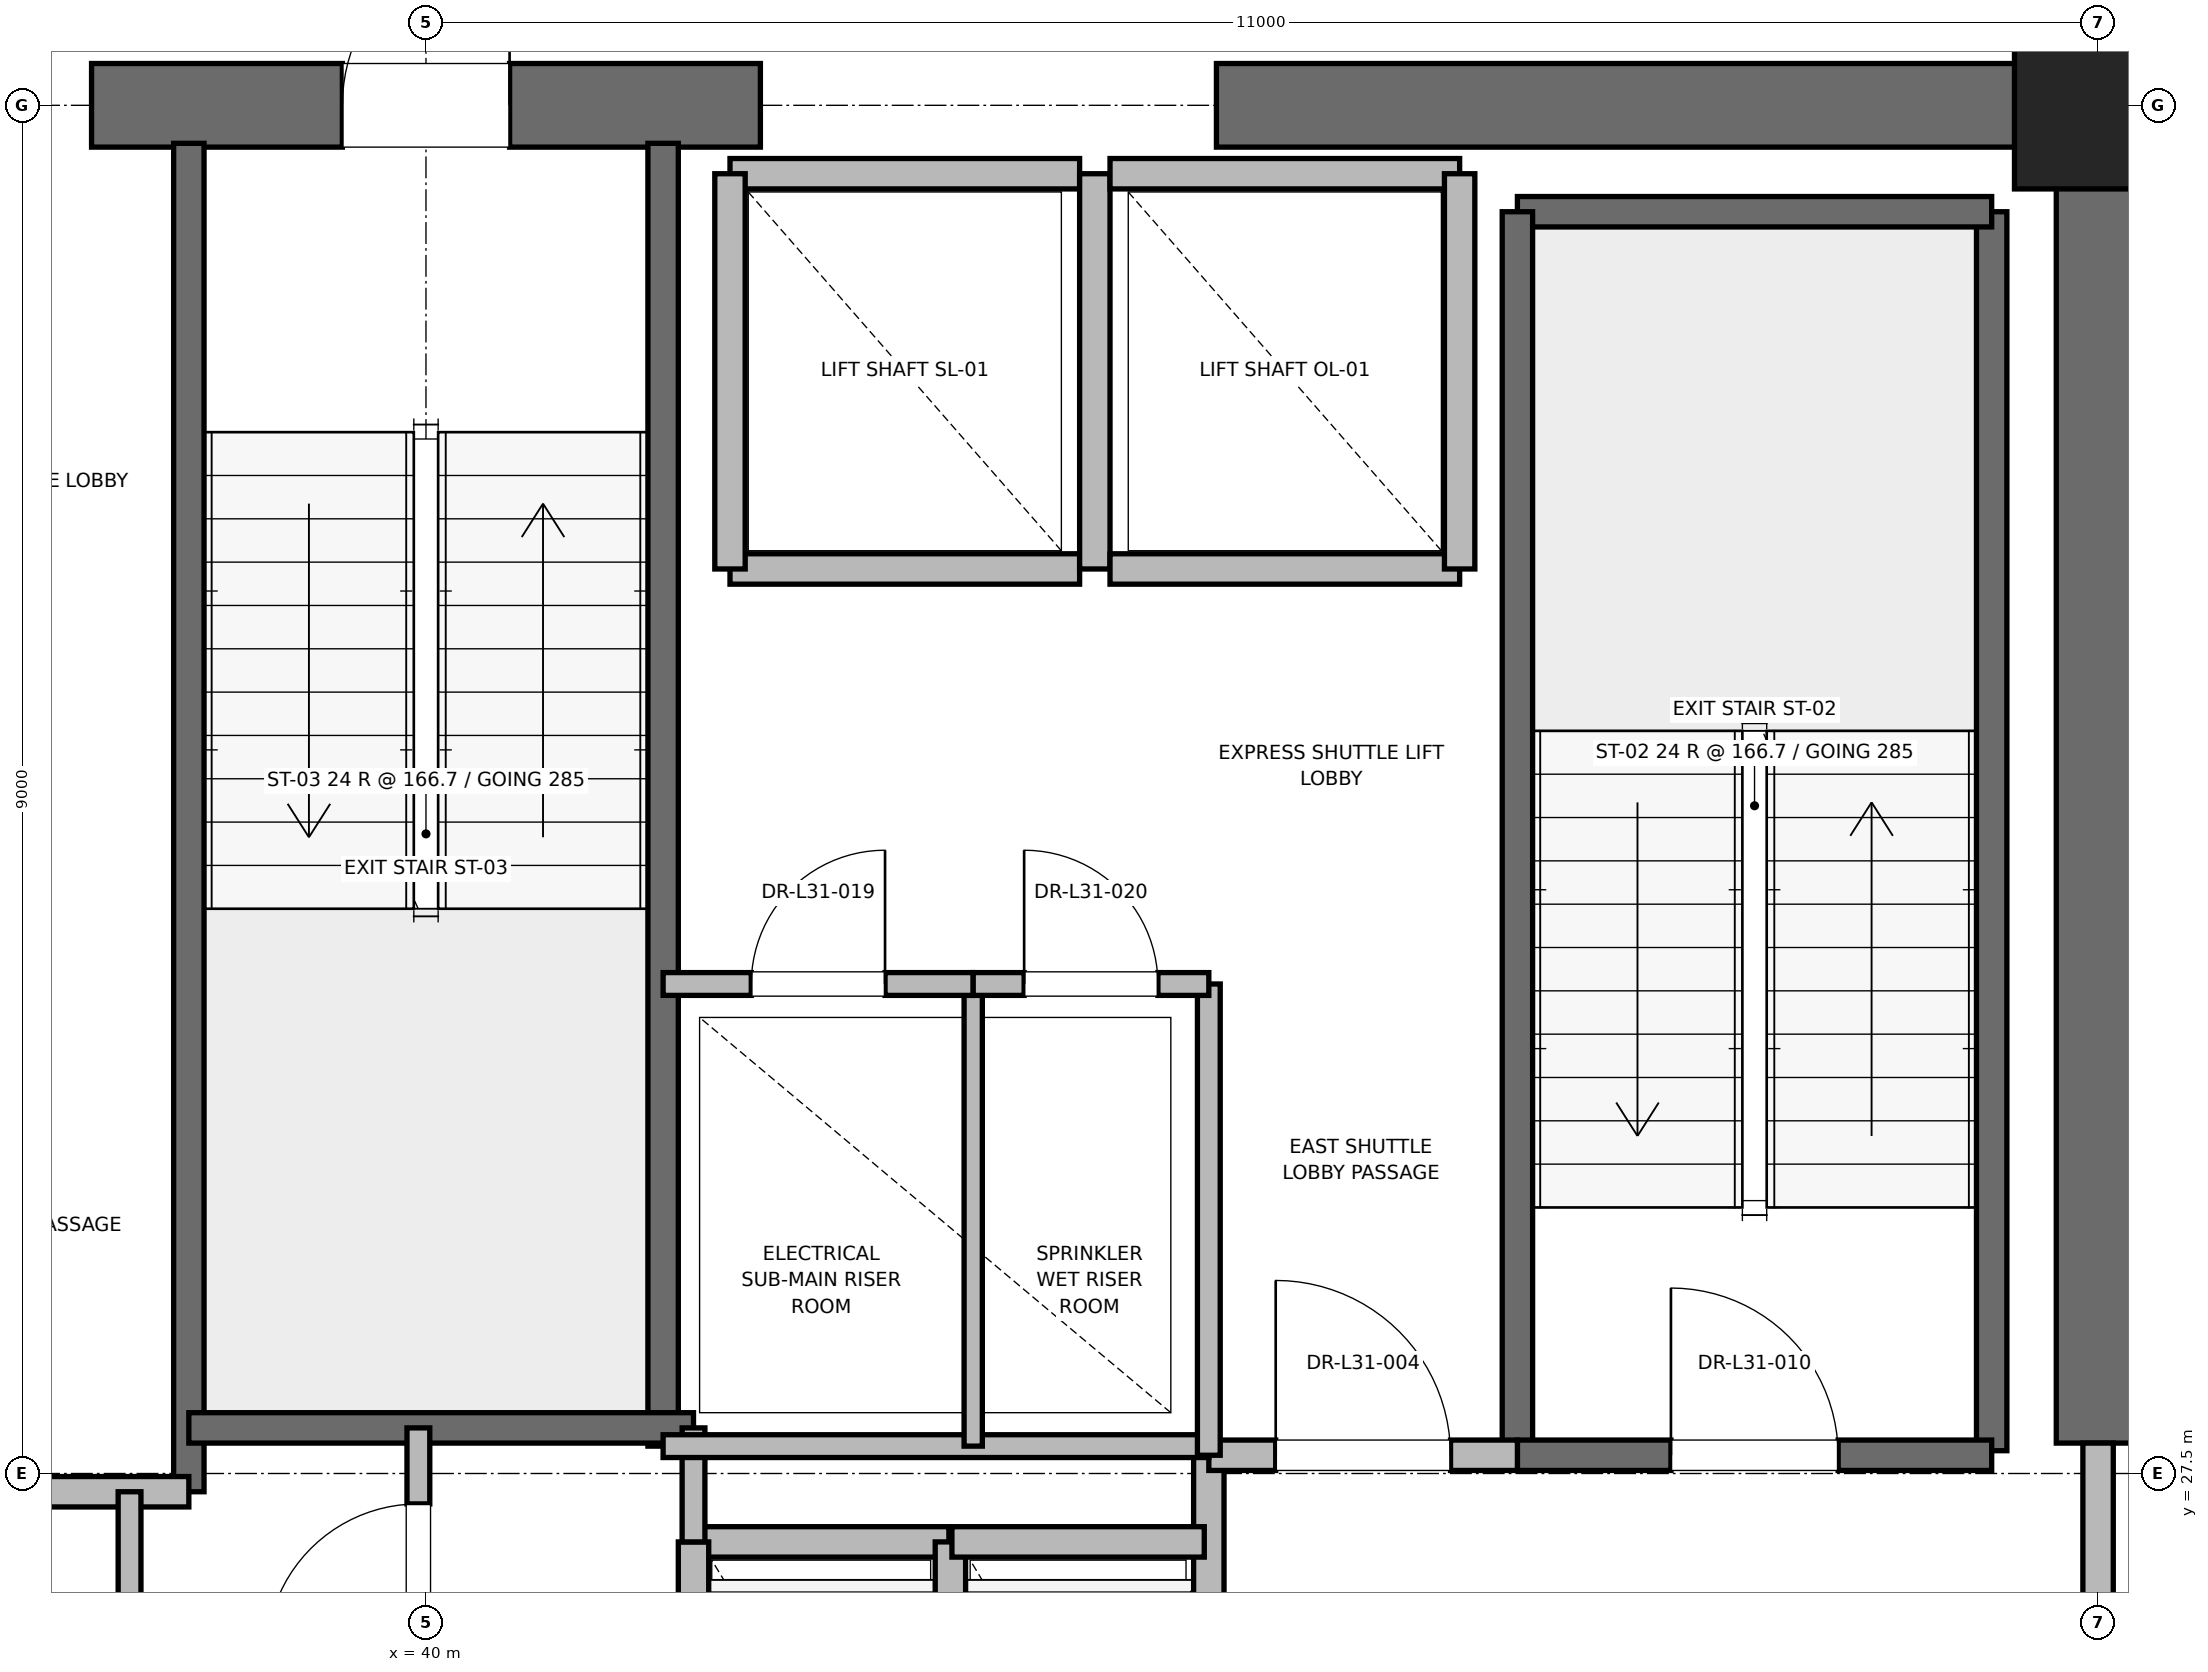
"""IFC4 building model, lengths in metres.
Left out: names, types, materials, properties, quantities, classifications, styles, units other than length and angle.
Written with IfcOpenShell. Run it as: python <this file> out.ifc"""

import sys

from ifc_helpers import new_model, si_unit, direction, frame, frame_2d, origin, origin_2d, place, context, subcontext, project, spatial, rectangle, extrude, element, fill, save


model = new_model("IFC4")
c1 = context("Model", 3, precision=1e-05, world=origin(), true_north=direction((0.0, 1.0)))
c2 = subcontext(c1, "Body", "Model", "MODEL_VIEW")
j1 = project(units=[si_unit("LENGTHUNIT", "METRE"), si_unit("PLANEANGLEUNIT", "RADIAN")], contexts=[c1])
p1 = place(None, origin())
s1 = spatial("IfcSite", under=j1, at=p1, CompositionType="ELEMENT")
p2 = place(p1, origin())
s2 = spatial("IfcBuilding", under=s1, at=p2, CompositionType="ELEMENT")
p3 = place(p2, frame((0.0, 0.0, 136.4)))
s3 = spatial("IfcBuildingStorey", under=s2, at=p3, CompositionType="ELEMENT", Elevation=136.4)
p4 = place(p3, frame((51.0, 36.5, 0.0), z_axis=(0.0, 0.0, 1.0), x_axis=(1.0, 0.0, 0.0)))
e1 = element("IfcColumn", 1, at=p4, inside=s3, PredefinedType="PILASTER", context=c2, shape_type="SweptSolid", body=[
    extrude(rectangle(XDim=1.1, YDim=1.1, at=origin_2d()), origin(), (0.0, 0.0, 1.0), 4.0),
])
p5 = place(p3, frame((37.8, 36.5, 0.0), z_axis=(0.0, 0.0, 1.0), x_axis=(1.0, 0.0, 0.0)))
e2 = element("IfcWall", 2, at=p5, inside=s3, PredefinedType="SHEAR", context=c2, shape_type="SweptSolid", body=[
    extrude(rectangle(XDim=4.4, YDim=0.55, at=frame_2d((2.2, 0.0))), origin(), (0.0, 0.0, 1.0), 3.775),
])
p6 = place(p5, frame((1.65, 0.0, 0.0)))
e3 = element("IfcOpeningElement", 3, at=p6, cuts=e2, PredefinedType="OPENING", context=c2, shape_type="SweptSolid", body=[
    extrude(rectangle(XDim=1.1, YDim=2.15, at=frame_2d((0.55, 1.075))), frame((0.0, 0.275, 0.0), z_axis=(0.0, -1.0, 0.0), x_axis=(1.0, 0.0, 0.0)), (0.0, 0.0, 1.0), 0.55),
])
p7 = place(p3, frame((45.2, 36.5, 0.0), z_axis=(0.0, 0.0, 1.0), x_axis=(1.0, 0.0, 0.0)))
e4 = element("IfcWall", 4, at=p7, inside=s3, PredefinedType="SHEAR", context=c2, shape_type="SweptSolid", body=[
    extrude(rectangle(XDim=5.8, YDim=0.55, at=frame_2d((2.9, 0.0))), origin(), (0.0, 0.0, 1.0), 3.775),
])
p8 = place(p3, frame((51.0, 27.7, 0.0), z_axis=(0.0, 0.0, 1.0), x_axis=(0.0, 1.0, 0.0)))
e5 = element("IfcWall", 5, at=p8, inside=s3, PredefinedType="SHEAR", context=c2, shape_type="SweptSolid", body=[
    extrude(rectangle(XDim=8.8, YDim=0.55, at=frame_2d((4.4, 0.0))), origin(), (0.0, 0.0, 1.0), 3.775),
])
p9 = place(p3, frame((50.3, 27.65, 0.0), z_axis=(0.0, 0.0, 1.0), x_axis=(0.0, 1.0, 0.0)))
e6 = element("IfcWall", 6, at=p9, inside=s3, PredefinedType="SOLIDWALL", context=c2, shape_type="SweptSolid", body=[
    extrude(rectangle(XDim=8.15, YDim=0.2, at=frame_2d((4.075, 0.0))), origin(), (0.0, 0.0, 1.0), 3.775),
])
p10 = place(p3, frame((47.18, 35.8, 0.0), z_axis=(0.0, 0.0, 1.0), x_axis=(1.0, 0.0, 0.0)))
e7 = element("IfcWall", 7, at=p10, inside=s3, PredefinedType="SOLIDWALL", context=c2, shape_type="SweptSolid", body=[
    extrude(rectangle(XDim=3.12, YDim=0.2, at=frame_2d((1.56, 0.0))), origin(), (0.0, 0.0, 1.0), 3.775),
])
p11 = place(p3, frame((47.18, 27.62, 0.0), z_axis=(0.0, 0.0, 1.0), x_axis=(0.0, 1.0, 0.0)))
e8 = element("IfcWall", 8, at=p11, inside=s3, PredefinedType="SOLIDWALL", context=c2, shape_type="SweptSolid", body=[
    extrude(rectangle(XDim=8.18, YDim=0.2, at=frame_2d((4.09, 0.0))), origin(), (0.0, 0.0, 1.0), 3.775),
])
p12 = place(p3, frame((47.18, 27.62, 0.0), z_axis=(0.0, 0.0, 1.0), x_axis=(1.0, 0.0, 0.0)))
e9 = element("IfcWall", 9, at=p12, inside=s3, PredefinedType="SOLIDWALL", context=c2, shape_type="SweptSolid", body=[
    extrude(rectangle(XDim=3.12, YDim=0.2, at=frame_2d((1.56, 0.0))), origin(), (0.0, 0.0, 1.0), 3.775),
])
p13 = place(p12, frame((1.01, 0.0, 0.0)))
e10 = element("IfcOpeningElement", 10, at=p13, cuts=e9, PredefinedType="OPENING", context=c2, shape_type="SweptSolid", body=[
    extrude(rectangle(XDim=1.1, YDim=2.15, at=frame_2d((0.55, 1.075))), frame((0.0, 0.1, 0.0), z_axis=(0.0, -1.0, 0.0), x_axis=(1.0, 0.0, 0.0)), (0.0, 0.0, 1.0), 0.2),
])
p14 = place(p3, frame((38.44, 27.38, 0.0), z_axis=(0.0, 0.0, 1.0), x_axis=(0.0, 1.0, 0.0)))
e11 = element("IfcWall", 11, at=p14, inside=s3, PredefinedType="SOLIDWALL", context=c2, shape_type="SweptSolid", body=[
    extrude(rectangle(XDim=8.87, YDim=0.2, at=frame_2d((4.435, 0.0))), origin(), (0.0, 0.0, 1.0), 3.775),
])
p15 = place(p3, frame((41.56, 27.68, 0.0), z_axis=(0.0, 0.0, 1.0), x_axis=(0.0, 1.0, 0.0)))
e12 = element("IfcWall", 12, at=p15, inside=s3, PredefinedType="SOLIDWALL", context=c2, shape_type="SweptSolid", body=[
    extrude(rectangle(XDim=8.57, YDim=0.2, at=frame_2d((4.285, 0.0))), origin(), (0.0, 0.0, 1.0), 3.775),
])
p16 = place(p3, frame((38.44, 27.8, 0.0), z_axis=(0.0, 0.0, 1.0), x_axis=(1.0, 0.0, 0.0)))
e13 = element("IfcWall", 13, at=p16, inside=s3, PredefinedType="SOLIDWALL", context=c2, shape_type="SweptSolid", body=[
    extrude(rectangle(XDim=3.32, YDim=0.2, at=frame_2d((1.66, 0.0))), origin(), (0.0, 0.0, 1.0), 3.775),
])
p17 = place(p3, frame((32.82, 27.38, 0.0), z_axis=(0.0, 0.0, 1.0), x_axis=(1.0, 0.0, 0.0)))
e14 = element("IfcWall", 14, at=p17, inside=s3, PredefinedType="PARTITIONING", context=c2, shape_type="SweptSolid", body=[
    extrude(rectangle(XDim=5.62, YDim=0.2, at=frame_2d((2.81, 0.0))), origin(), (0.0, 0.0, 1.0), 3.775),
])
p18 = place(p3, frame((45.15, 24.25, 0.0), z_axis=(0.0, 0.0, 1.0), x_axis=(0.0, 1.0, 0.0)))
e15 = element("IfcWall", 15, at=p18, inside=s3, PredefinedType="PARTITIONING", context=c2, shape_type="SweptSolid", body=[
    extrude(rectangle(XDim=3.37, YDim=0.2, at=frame_2d((1.685, 0.0))), origin(), (0.0, 0.0, 1.0), 3.775),
])
p19 = place(p3, frame((45.15, 27.62, 0.0), z_axis=(0.0, 0.0, 1.0), x_axis=(1.0, 0.0, 0.0)))
e16 = element("IfcWall", 16, at=p19, inside=s3, PredefinedType="PARTITIONING", context=c2, shape_type="SweptSolid", body=[
    extrude(rectangle(XDim=2.03, YDim=0.2, at=frame_2d((1.015, 0.0))), origin(), (0.0, 0.0, 1.0), 3.775),
])
p20 = place(p19, frame((0.44, 0.0, 0.0)))
e17 = element("IfcOpeningElement", 17, at=p20, cuts=e16, PredefinedType="OPENING", context=c2, shape_type="SweptSolid", body=[
    extrude(rectangle(XDim=1.15, YDim=2.2, at=frame_2d((0.575, 1.1))), frame((0.0, 0.1, 0.0), z_axis=(0.0, -1.0, 0.0), x_axis=(1.0, 0.0, 0.0)), (0.0, 0.0, 1.0), 0.2),
])
p21 = place(p3, frame((51.0, 24.3, 0.0), z_axis=(0.0, 0.0, 1.0), x_axis=(0.0, 1.0, 0.0)))
e18 = element("IfcWall", 18, at=p21, inside=s3, PredefinedType="PARTITIONING", context=c2, shape_type="SweptSolid", body=[
    extrude(rectangle(XDim=3.4, YDim=0.2, at=frame_2d((1.7, 0.0))), origin(), (0.0, 0.0, 1.0), 2.755),
])
p22 = place(p21, frame((1.125, 0.0, 0.0)))
e19 = element("IfcOpeningElement", 19, at=p22, cuts=e18, PredefinedType="OPENING", context=c2, shape_type="SweptSolid", body=[
    extrude(rectangle(XDim=1.15, YDim=2.2, at=frame_2d((0.575, 1.1))), frame((0.0, 0.1, 0.0), z_axis=(0.0, -1.0, 0.0), x_axis=(1.0, 0.0, 0.0)), (0.0, 0.0, 1.0), 0.2),
])
p23 = place(p3, frame((43.44, 27.05, 0.0), z_axis=(0.0, 0.0, 1.0), x_axis=(-1.0, 0.0, 0.0)))
e20 = element("IfcWall", 20, at=p23, inside=s3, PredefinedType="SOLIDWALL", context=c2, shape_type="SweptSolid", body=[
    extrude(rectangle(XDim=1.68, YDim=0.2, at=frame_2d((0.84, 0.0))), origin(), (0.0, 0.0, 1.0), 3.775),
])
for number, where, z_axis, x_axis in (
    (21, (41.76, 27.05, 0.0), (0.0, 0.0, 1.0), (0.0, -1.0, 0.0)),
    (22, (43.45, 24.45, 0.0), (0.0, 0.0, 1.0), (0.0, 1.0, 0.0)),
):
    element("IfcWall", number, at=place(p3, frame(where, z_axis=z_axis, x_axis=x_axis)), inside=s3, PredefinedType="SOLIDWALL", context=c2, shape_type="SweptSolid", body=[
        extrude(rectangle(XDim=2.6, YDim=0.2, at=frame_2d((1.3, 0.0))), origin(), (0.0, 0.0, 1.0), 3.775),
    ])
p24 = place(p3, frame((45.12, 27.05, 0.0), z_axis=(0.0, 0.0, 1.0), x_axis=(-1.0, 0.0, 0.0)))
e23 = element("IfcWall", 23, at=p24, inside=s3, PredefinedType="SOLIDWALL", context=c2, shape_type="SweptSolid", body=[
    extrude(rectangle(XDim=1.66, YDim=0.2, at=frame_2d((0.83, 0.0))), origin(), (0.0, 0.0, 1.0), 3.775),
])
p25 = place(p3, frame((42.0, 33.45, 0.0), z_axis=(0.0, 0.0, 1.0), x_axis=(1.0, 0.0, 0.0)))
e24 = element("IfcWall", 24, at=p25, inside=s3, PredefinedType="SOLIDWALL", context=c2, shape_type="SweptSolid", body=[
    extrude(rectangle(XDim=2.3, YDim=0.2, at=frame_2d((1.15, 0.0))), origin(), (0.0, 0.0, 1.0), 3.775),
])
p26 = place(p3, frame((44.3, 36.05, 0.0), z_axis=(0.0, 0.0, 1.0), x_axis=(-1.0, 0.0, 0.0)))
e25 = element("IfcWall", 25, at=p26, inside=s3, PredefinedType="SOLIDWALL", context=c2, shape_type="SweptSolid", body=[
    extrude(rectangle(XDim=2.3, YDim=0.2, at=frame_2d((1.15, 0.0))), origin(), (0.0, 0.0, 1.0), 2.755),
])
for number, where, z_axis, x_axis in (
    (26, (42.0, 36.05, 0.0), (0.0, 0.0, 1.0), (0.0, -1.0, 0.0)),
    (27, (44.4, 33.45, 0.0), (0.0, 0.0, 1.0), (0.0, 1.0, 0.0)),
):
    element("IfcWall", number, at=place(p3, frame(where, z_axis=z_axis, x_axis=x_axis)), inside=s3, PredefinedType="SOLIDWALL", context=c2, shape_type="SweptSolid", body=[
        extrude(rectangle(XDim=2.6, YDim=0.2, at=frame_2d((1.3, 0.0))), origin(), (0.0, 0.0, 1.0), 2.755),
    ])
p27 = place(p3, frame((44.5, 33.45, 0.0), z_axis=(0.0, 0.0, 1.0), x_axis=(1.0, 0.0, 0.0)))
e28 = element("IfcWall", 28, at=p27, inside=s3, PredefinedType="SOLIDWALL", context=c2, shape_type="SweptSolid", body=[
    extrude(rectangle(XDim=2.3, YDim=0.2, at=frame_2d((1.15, 0.0))), origin(), (0.0, 0.0, 1.0), 3.775),
])
p28 = place(p3, frame((46.8, 36.05, 0.0), z_axis=(0.0, 0.0, 1.0), x_axis=(-1.0, 0.0, 0.0)))
e29 = element("IfcWall", 29, at=p28, inside=s3, PredefinedType="SOLIDWALL", context=c2, shape_type="SweptSolid", body=[
    extrude(rectangle(XDim=2.3, YDim=0.2, at=frame_2d((1.15, 0.0))), origin(), (0.0, 0.0, 1.0), 2.755),
])
p29 = place(p3, frame((46.8, 33.45, 0.0), z_axis=(0.0, 0.0, 1.0), x_axis=(0.0, 1.0, 0.0)))
e30 = element("IfcWall", 30, at=p29, inside=s3, PredefinedType="SOLIDWALL", context=c2, shape_type="SweptSolid", body=[
    extrude(rectangle(XDim=2.6, YDim=0.2, at=frame_2d((1.3, 0.0))), origin(), (0.0, 0.0, 1.0), 3.775),
])
p30 = place(p3, frame((41.76, 27.05, 0.0), z_axis=(0.0, 0.0, 1.0), x_axis=(0.0, 1.0, 0.0)))
e31 = element("IfcWall", 31, at=p30, inside=s3, PredefinedType="PARTITIONING", context=c2, shape_type="SweptSolid", body=[
    extrude(rectangle(XDim=0.75, YDim=0.15, at=frame_2d((0.375, 0.0))), origin(), (0.0, 0.0, 1.0), 2.85),
])
p31 = place(p3, frame((39.95, 25.8, 0.0), z_axis=(0.0, 0.0, 1.0), x_axis=(0.0, 1.0, 0.0)))
e32 = element("IfcWall", 32, at=p31, inside=s3, PredefinedType="PARTITIONING", context=c2, shape_type="SweptSolid", body=[
    extrude(rectangle(XDim=2.0, YDim=0.15, at=frame_2d((1.0, 0.0))), origin(), (0.0, 0.0, 1.0), 2.85),
])
p32 = place(p31, frame((0.5, 0.0, 0.0)))
e33 = element("IfcOpeningElement", 33, at=p32, cuts=e32, PredefinedType="OPENING", context=c2, shape_type="SweptSolid", body=[
    extrude(rectangle(XDim=1.0, YDim=2.15, at=frame_2d((0.5, 1.075))), frame((0.0, 0.075, 0.0), z_axis=(0.0, -1.0, 0.0), x_axis=(1.0, 0.0, 0.0)), (0.0, 0.0, 1.0), 0.15),
])
p33 = place(p3, frame((38.05, 24.5, 0.0), z_axis=(0.0, 0.0, 1.0), x_axis=(0.0, 1.0, 0.0)))
e34 = element("IfcWall", 34, at=p33, inside=s3, PredefinedType="PARTITIONING", context=c2, shape_type="SweptSolid", body=[
    extrude(rectangle(XDim=2.88, YDim=0.15, at=frame_2d((1.44, 0.0))), origin(), (0.0, 0.0, 1.0), 2.85),
])
p34 = place(p33, frame((0.94, 0.0, 0.0)))
e35 = element("IfcOpeningElement", 35, at=p34, cuts=e34, PredefinedType="OPENING", context=c2, shape_type="SweptSolid", body=[
    extrude(rectangle(XDim=1.0, YDim=2.15, at=frame_2d((0.5, 1.075))), frame((0.0, 0.075, 0.0), z_axis=(0.0, -1.0, 0.0), x_axis=(1.0, 0.0, 0.0)), (0.0, 0.0, 1.0), 0.15),
])
p35 = place(p3, frame((41.56, 27.68, 0.0), z_axis=(0.0, 0.0, 1.0), x_axis=(1.0, 0.0, 0.0)))
e36 = element("IfcWall", 36, at=p35, inside=s3, PredefinedType="PARTITIONING", context=c2, shape_type="SweptSolid", body=[
    extrude(rectangle(XDim=3.59, YDim=0.15, at=frame_2d((1.795, 0.0))), origin(), (0.0, 0.0, 1.0), 2.85),
])
p36 = place(p3, frame((45.15, 27.62, 0.0), z_axis=(0.0, 0.0, 1.0), x_axis=(0.0, 1.0, 0.0)))
e37 = element("IfcWall", 37, at=p36, inside=s3, PredefinedType="PARTITIONING", context=c2, shape_type="SweptSolid", body=[
    extrude(rectangle(XDim=3.1, YDim=0.15, at=frame_2d((1.55, 0.0))), origin(), (0.0, 0.0, 1.0), 2.85),
])
p37 = place(p3, frame((43.6, 27.68, 0.0), z_axis=(0.0, 0.0, 1.0), x_axis=(0.0, 1.0, 0.0)))
e38 = element("IfcWall", 38, at=p37, inside=s3, PredefinedType="PARTITIONING", context=c2, shape_type="SweptSolid", body=[
    extrude(rectangle(XDim=3.04, YDim=0.12, at=frame_2d((1.52, 0.0))), origin(), (0.0, 0.0, 1.0), 2.85),
])
p38 = place(p3, frame((41.56, 30.72, 0.0), z_axis=(0.0, 0.0, 1.0), x_axis=(1.0, 0.0, 0.0)))
e39 = element("IfcWall", 39, at=p38, inside=s3, PredefinedType="PARTITIONING", context=c2, shape_type="SweptSolid", body=[
    extrude(rectangle(XDim=2.04, YDim=0.15, at=frame_2d((1.02, 0.0))), origin(), (0.0, 0.0, 1.0), 2.85),
])
p39 = place(p38, frame((0.58, 0.0, 0.0)))
e40 = element("IfcOpeningElement", 40, at=p39, cuts=e39, PredefinedType="OPENING", context=c2, shape_type="SweptSolid", body=[
    extrude(rectangle(XDim=0.88, YDim=2.1, at=frame_2d((0.44, 1.05))), frame((0.0, 0.075, 0.0), z_axis=(0.0, -1.0, 0.0), x_axis=(1.0, 0.0, 0.0)), (0.0, 0.0, 1.0), 0.15),
])
p40 = place(p3, frame((43.6, 30.72, 0.0), z_axis=(0.0, 0.0, 1.0), x_axis=(1.0, 0.0, 0.0)))
e41 = element("IfcWall", 41, at=p40, inside=s3, PredefinedType="PARTITIONING", context=c2, shape_type="SweptSolid", body=[
    extrude(rectangle(XDim=1.55, YDim=0.15, at=frame_2d((0.775, 0.0))), origin(), (0.0, 0.0, 1.0), 2.85),
])
p41 = place(p40, frame((0.335, 0.0, 0.0)))
e42 = element("IfcOpeningElement", 42, at=p41, cuts=e41, PredefinedType="OPENING", context=c2, shape_type="SweptSolid", body=[
    extrude(rectangle(XDim=0.88, YDim=2.1, at=frame_2d((0.44, 1.05))), frame((0.0, 0.075, 0.0), z_axis=(0.0, -1.0, 0.0), x_axis=(1.0, 0.0, 0.0)), (0.0, 0.0, 1.0), 0.15),
])
p42 = place(p13, origin())
e43 = element("IfcDoor", 43, at=p42, inside=s3, OperationType="SINGLE_SWING_LEFT", PredefinedType="DOOR", context=c2, shape_type="SweptSolid", body=[
    extrude(rectangle(XDim=1.1, YDim=2.15, at=frame_2d((0.55, 1.075))), frame((0.0, 0.025, 0.0), z_axis=(0.0, -1.0, 0.0), x_axis=(1.0, 0.0, 0.0)), (0.0, 0.0, 1.0), 0.05),
])
fill(e10, e43)
p43 = place(p6, origin())
e44 = element("IfcDoor", 44, at=p43, inside=s3, OperationType="SINGLE_SWING_RIGHT", PredefinedType="DOOR", context=c2, shape_type="SweptSolid", body=[
    extrude(rectangle(XDim=1.1, YDim=2.15, at=frame_2d((0.55, 1.075))), frame((0.0, 0.025, 0.0), z_axis=(0.0, -1.0, 0.0), x_axis=(1.0, 0.0, 0.0)), (0.0, 0.0, 1.0), 0.05),
])
fill(e3, e44)
p44 = place(p20, origin())
e45 = element("IfcDoor", 45, at=p44, inside=s3, OperationType="SINGLE_SWING_LEFT", PredefinedType="DOOR", context=c2, shape_type="SweptSolid", body=[
    extrude(rectangle(XDim=1.15, YDim=2.2, at=frame_2d((0.575, 1.1))), frame((0.0, 0.025, 0.0), z_axis=(0.0, -1.0, 0.0), x_axis=(1.0, 0.0, 0.0)), (0.0, 0.0, 1.0), 0.05),
])
fill(e17, e45)
p45 = place(p32, origin())
e46 = element("IfcDoor", 46, at=p45, inside=s3, OperationType="SINGLE_SWING_LEFT", PredefinedType="DOOR", context=c2, shape_type="SweptSolid", body=[
    extrude(rectangle(XDim=1.0, YDim=2.15, at=frame_2d((0.5, 1.075))), frame((0.0, 0.025, 0.0), z_axis=(0.0, -1.0, 0.0), x_axis=(1.0, 0.0, 0.0)), (0.0, 0.0, 1.0), 0.05),
])
fill(e33, e46)
p46 = place(p39, origin())
e47 = element("IfcDoor", 47, at=p46, inside=s3, OperationType="SINGLE_SWING_RIGHT", PredefinedType="DOOR", context=c2, shape_type="SweptSolid", body=[
    extrude(rectangle(XDim=0.88, YDim=2.1, at=frame_2d((0.44, 1.05))), frame((0.0, 0.025, 0.0), z_axis=(0.0, -1.0, 0.0), x_axis=(1.0, 0.0, 0.0)), (0.0, 0.0, 1.0), 0.05),
])
fill(e40, e47)
p47 = place(p41, origin())
e48 = element("IfcDoor", 48, at=p47, inside=s3, OperationType="SINGLE_SWING_LEFT", PredefinedType="DOOR", context=c2, shape_type="SweptSolid", body=[
    extrude(rectangle(XDim=0.88, YDim=2.1, at=frame_2d((0.44, 1.05))), frame((0.0, 0.025, 0.0), z_axis=(0.0, -1.0, 0.0), x_axis=(1.0, 0.0, 0.0)), (0.0, 0.0, 1.0), 0.05),
])
fill(e42, e48)
save(model, sys.argv[1])
